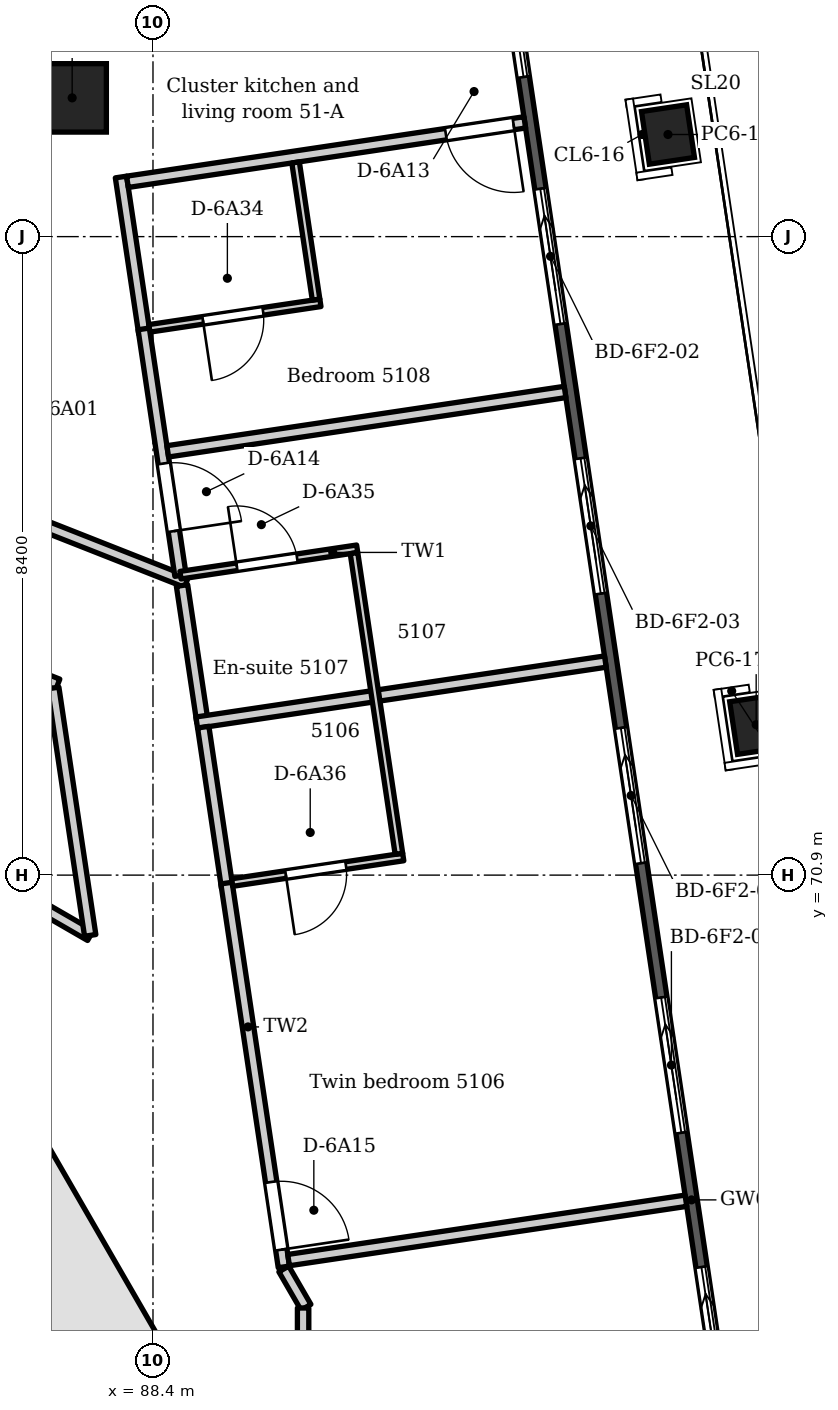
"""IFC4 building model, lengths in metres.
Left out: names, types, materials, properties, quantities, classifications, styles, units other than length and angle.
Written with IfcOpenShell. Run it as: python <this file> out.ifc"""

import sys

from ifc_helpers import new_model, si_unit, direction, frame, frame_2d, origin, origin_2d, place, context, subcontext, project, spatial, polyline, rectangle, circle, outline, extrude, element, fill, save


model = new_model("IFC4")
c1 = context("Model", 3, precision=1e-05, world=origin(), true_north=direction((0.0, 1.0)))
c2 = subcontext(c1, "Body", "Model", "MODEL_VIEW")
j1 = project(units=[si_unit("LENGTHUNIT", "METRE"), si_unit("PLANEANGLEUNIT", "RADIAN")], contexts=[c1])
p1 = place(None, origin())
s1 = spatial("IfcSite", under=j1, at=p1, CompositionType="ELEMENT")
p2 = place(p1, origin())
s2 = spatial("IfcBuilding", under=s1, at=p2, CompositionType="ELEMENT")
p3 = place(p2, frame((0.0, 0.0, 198.0)))
s3 = spatial("IfcBuildingStorey", under=s2, at=p3, CompositionType="ELEMENT", Elevation=198.0)
p4 = place(p3, frame((88.197, 64.603, 0.0), z_axis=(0.0, 0.0, 1.0), x_axis=(-0.499983800959, 0.866034756103, 0.0)))
e1 = element("IfcWall", 1, at=p4, inside=s3, PredefinedType="SHEAR", context=c2, shape_type="SweptSolid", body=[
    extrude(outline(polyline([(0.0, -0.35), (4.555, -0.35), (4.368, 0.35), (0.188, 0.35), (0.0, -0.35)])), origin(), (0.0, 0.0, 1.0), 3.6),
])
p5 = place(p4, frame((1.677, 0.0, 0.0)))
e2 = element("IfcOpeningElement", 2, at=p5, cuts=e1, PredefinedType="OPENING", context=c2, shape_type="SweptSolid", body=[
    extrude(rectangle(XDim=1.2, YDim=2.1, at=frame_2d((0.6, 1.05))), frame((0.0, 0.36, 0.0), z_axis=(0.0, -1.0, 0.0), x_axis=(1.0, 0.0, 0.0)), (0.0, 0.0, 1.0), 0.72),
])
p6 = place(p3, frame((83.619, 63.031, 0.0), z_axis=(0.0, 0.0, 1.0), x_axis=(0.866059941101, 0.499940174841, 0.0)))
e3 = element("IfcWall", 3, at=p6, inside=s3, PredefinedType="SHEAR", context=c2, shape_type="SweptSolid", body=[
    extrude(rectangle(XDim=4.4, YDim=0.3, at=frame_2d((2.2, 0.0))), origin(), (0.0, 0.0, 1.0), 3.6),
])
p7 = place(p6, frame((1.4, 0.0, 0.0)))
e4 = element("IfcOpeningElement", 4, at=p7, cuts=e3, PredefinedType="OPENING", context=c2, shape_type="SweptSolid", body=[
    extrude(rectangle(XDim=0.9, YDim=2.1, at=frame_2d((0.45, 1.05))), frame((0.0, 0.16, 0.0), z_axis=(0.0, -1.0, 0.0), x_axis=(1.0, 0.0, 0.0)), (0.0, 0.0, 1.0), 0.32),
])
for number, where, z_axis, x_axis in (
    (5, (95.175, 80.644, -0.35), (0.0, 0.0, 1.0), (-0.148, 0.989, 0.0)),
    (6, (96.336, 72.879, -0.35), (0.0, 0.0, 1.0), (-0.148, 0.989, 0.0)),
):
    element("IfcColumn", number, at=place(p3, frame(where, z_axis=z_axis, x_axis=x_axis)), inside=s3, PredefinedType="COLUMN", context=c2, shape_type="SweptSolid", body=[
        extrude(rectangle(XDim=0.7, YDim=0.6, at=origin_2d()), origin(), (0.0, 0.0, 1.0), 3.95),
    ])
p8 = place(p3, frame((87.337, 81.125, -0.35), z_axis=(0.0, 0.0, 1.0), x_axis=(1.0, 0.0, 0.0)))
e7 = element("IfcColumn", 7, at=p8, inside=s3, PredefinedType="COLUMN", context=c2, shape_type="SweptSolid", body=[
    extrude(circle(Radius=0.45, at=origin_2d()), origin(), (0.0, 0.0, 1.0), 3.95),
])
p9 = place(p3, frame((92.835, 84.36, 0.0), z_axis=(0.0, 0.0, 1.0), x_axis=(0.147810490781, -0.989015702006, 0.0)))
e8 = element("IfcWall", 8, at=p9, inside=s3, PredefinedType="SOLIDWALL", context=c2, shape_type="SweptSolid", body=[
    extrude(outline(polyline([(0.149, 0.075), (0.149, -0.075), (39.297, -0.075), (39.297, 0.075), (0.149, 0.075)])), origin(), (0.0, 0.0, 1.0), 3.3),
])
p10 = place(p9, frame((1.193, 0.0, 0.0)))
e9 = element("IfcOpeningElement", 9, at=p10, cuts=e8, PredefinedType="OPENING", context=c2, shape_type="SweptSolid", body=[
    extrude(rectangle(XDim=1.8, YDim=2.6, at=frame_2d((0.9, 1.3))), frame((0.0, 0.085, 0.0), z_axis=(0.0, -1.0, 0.0), x_axis=(1.0, 0.0, 0.0)), (0.0, 0.0, 1.0), 0.17),
])
p11 = place(p9, frame((4.479, 0.0, 0.0)))
e10 = element("IfcOpeningElement", 10, at=p11, cuts=e8, PredefinedType="OPENING", context=c2, shape_type="SweptSolid", body=[
    extrude(rectangle(XDim=1.8, YDim=2.6, at=frame_2d((0.9, 1.3))), frame((0.0, 0.085, 0.0), z_axis=(0.0, -1.0, 0.0), x_axis=(1.0, 0.0, 0.0)), (0.0, 0.0, 1.0), 0.17),
])
p12 = place(p9, frame((8.065, 0.0, 0.0)))
e11 = element("IfcOpeningElement", 11, at=p12, cuts=e8, PredefinedType="OPENING", context=c2, shape_type="SweptSolid", body=[
    extrude(rectangle(XDim=1.8, YDim=2.6, at=frame_2d((0.9, 1.3))), frame((0.0, 0.085, 0.0), z_axis=(0.0, -1.0, 0.0), x_axis=(1.0, 0.0, 0.0)), (0.0, 0.0, 1.0), 0.17),
])
p13 = place(p9, frame((11.651, 0.0, 0.0)))
e12 = element("IfcOpeningElement", 12, at=p13, cuts=e8, PredefinedType="OPENING", context=c2, shape_type="SweptSolid", body=[
    extrude(rectangle(XDim=1.8, YDim=2.6, at=frame_2d((0.9, 1.3))), frame((0.0, 0.085, 0.0), z_axis=(0.0, -1.0, 0.0), x_axis=(1.0, 0.0, 0.0)), (0.0, 0.0, 1.0), 0.17),
])
p14 = place(p9, frame((15.237, 0.0, 0.0)))
e13 = element("IfcOpeningElement", 13, at=p14, cuts=e8, PredefinedType="OPENING", context=c2, shape_type="SweptSolid", body=[
    extrude(rectangle(XDim=1.8, YDim=2.6, at=frame_2d((0.9, 1.3))), frame((0.0, 0.085, 0.0), z_axis=(0.0, -1.0, 0.0), x_axis=(1.0, 0.0, 0.0)), (0.0, 0.0, 1.0), 0.17),
])
p15 = place(p9, frame((18.823, 0.0, 0.0)))
e14 = element("IfcOpeningElement", 14, at=p15, cuts=e8, PredefinedType="OPENING", context=c2, shape_type="SweptSolid", body=[
    extrude(rectangle(XDim=1.8, YDim=2.6, at=frame_2d((0.9, 1.3))), frame((0.0, 0.085, 0.0), z_axis=(0.0, -1.0, 0.0), x_axis=(1.0, 0.0, 0.0)), (0.0, 0.0, 1.0), 0.17),
])
p16 = place(p9, frame((22.409, 0.0, 0.0)))
e15 = element("IfcOpeningElement", 15, at=p16, cuts=e8, PredefinedType="OPENING", context=c2, shape_type="SweptSolid", body=[
    extrude(rectangle(XDim=1.8, YDim=2.6, at=frame_2d((0.9, 1.3))), frame((0.0, 0.085, 0.0), z_axis=(0.0, -1.0, 0.0), x_axis=(1.0, 0.0, 0.0)), (0.0, 0.0, 1.0), 0.17),
])
p17 = place(p9, frame((25.995, 0.0, 0.0)))
e16 = element("IfcOpeningElement", 16, at=p17, cuts=e8, PredefinedType="OPENING", context=c2, shape_type="SweptSolid", body=[
    extrude(rectangle(XDim=1.8, YDim=2.6, at=frame_2d((0.9, 1.3))), frame((0.0, 0.085, 0.0), z_axis=(0.0, -1.0, 0.0), x_axis=(1.0, 0.0, 0.0)), (0.0, 0.0, 1.0), 0.17),
])
p18 = place(p9, frame((29.581, 0.0, 0.0)))
e17 = element("IfcOpeningElement", 17, at=p18, cuts=e8, PredefinedType="OPENING", context=c2, shape_type="SweptSolid", body=[
    extrude(rectangle(XDim=1.8, YDim=2.6, at=frame_2d((0.9, 1.3))), frame((0.0, 0.085, 0.0), z_axis=(0.0, -1.0, 0.0), x_axis=(1.0, 0.0, 0.0)), (0.0, 0.0, 1.0), 0.17),
])
p19 = place(p9, frame((33.167, 0.0, 0.0)))
e18 = element("IfcOpeningElement", 18, at=p19, cuts=e8, PredefinedType="OPENING", context=c2, shape_type="SweptSolid", body=[
    extrude(rectangle(XDim=1.8, YDim=2.6, at=frame_2d((0.9, 1.3))), frame((0.0, 0.085, 0.0), z_axis=(0.0, -1.0, 0.0), x_axis=(1.0, 0.0, 0.0)), (0.0, 0.0, 1.0), 0.17),
])
p20 = place(p9, frame((36.453, 0.0, 0.0)))
e19 = element("IfcOpeningElement", 19, at=p20, cuts=e8, PredefinedType="OPENING", context=c2, shape_type="SweptSolid", body=[
    extrude(rectangle(XDim=1.8, YDim=2.6, at=frame_2d((0.9, 1.3))), frame((0.0, 0.085, 0.0), z_axis=(0.0, -1.0, 0.0), x_axis=(1.0, 0.0, 0.0)), (0.0, 0.0, 1.0), 0.17),
])
p21 = place(p3, frame((82.353, 75.298, 0.0), z_axis=(0.0, 0.0, 1.0), x_axis=(0.930366278921, -0.366631404883, 0.0)))
e20 = element("IfcWall", 20, at=p21, inside=s3, PredefinedType="PARTITIONING", context=c2, shape_type="SweptSolid", body=[
    extrude(rectangle(XDim=5.153, YDim=0.15, at=frame_2d((2.576, 0.0))), origin(), (0.0, 0.0, 1.0), 2.8),
])
p22 = place(p3, frame((82.845, 72.837, 0.0), z_axis=(0.0, 0.0, 1.0), x_axis=(0.865990633405, -0.500060219228, 0.0)))
e21 = element("IfcWall", 21, at=p22, inside=s3, PredefinedType="PARTITIONING", context=c2, shape_type="SweptSolid", body=[
    extrude(rectangle(XDim=5.464, YDim=0.15, at=frame_2d((2.732, 0.0))), origin(), (0.0, 0.0, 1.0), 2.8),
])
p23 = place(p22, frame((2.281, 0.0, 0.0)))
e22 = element("IfcOpeningElement", 22, at=p23, cuts=e21, PredefinedType="OPENING", context=c2, shape_type="SweptSolid", body=[
    extrude(rectangle(XDim=0.9, YDim=2.1, at=frame_2d((0.45, 1.05))), frame((0.0, 0.085, 0.0), z_axis=(0.0, -1.0, 0.0), x_axis=(1.0, 0.0, 0.0)), (0.0, 0.0, 1.0), 0.17),
])
p24 = place(p3, frame((86.757, 75.578, 0.0), z_axis=(0.0, 0.0, 1.0), x_axis=(0.930344172236, -0.366687497997, 0.0)))
e23 = element("IfcWall", 23, at=p24, inside=s3, PredefinedType="PARTITIONING", context=c2, shape_type="SweptSolid", body=[
    extrude(rectangle(XDim=2.24, YDim=0.15, at=frame_2d((1.12, 0.0))), origin(), (0.0, 0.0, 1.0), 3.3),
])
p25 = place(p3, frame((87.088, 73.362, 0.0), z_axis=(0.0, 0.0, 1.0), x_axis=(0.147629393442, -0.989042750437, 0.0)))
e24 = element("IfcWall", 24, at=p25, inside=s3, PredefinedType="PARTITIONING", context=c2, shape_type="SweptSolid", body=[
    extrude(rectangle(XDim=3.291, YDim=0.15, at=frame_2d((1.646, 0.0))), origin(), (0.0, 0.0, 1.0), 3.3),
])
p26 = place(p3, frame((87.979, 80.084, 0.0), z_axis=(0.0, 0.0, 1.0), x_axis=(0.147880939426, -0.989005170742, 0.0)))
e25 = element("IfcWall", 25, at=p26, inside=s3, PredefinedType="PARTITIONING", context=c2, shape_type="SweptSolid", body=[
    extrude(rectangle(XDim=2.079, YDim=0.15, at=frame_2d((1.039, 0.0))), origin(), (0.0, 0.0, 1.0), 3.3),
])
p27 = place(p3, frame((88.064, 80.021, 0.0), z_axis=(0.0, 0.0, 1.0), x_axis=(0.988994889639, 0.147949681543, 0.0)))
e26 = element("IfcWall", 26, at=p27, inside=s3, PredefinedType="PARTITIONING", context=c2, shape_type="SweptSolid", body=[
    extrude(rectangle(XDim=5.285, YDim=0.15, at=frame_2d((2.643, 0.0))), origin(), (0.0, 0.0, 1.0), 3.3),
])
p28 = place(p27, frame((4.235, 0.0, 0.0)))
e27 = element("IfcOpeningElement", 27, at=p28, cuts=e26, PredefinedType="OPENING", context=c2, shape_type="SweptSolid", body=[
    extrude(rectangle(XDim=0.9, YDim=2.1, at=frame_2d((0.45, 1.05))), frame((0.0, 0.085, 0.0), z_axis=(0.0, -1.0, 0.0), x_axis=(1.0, 0.0, 0.0)), (0.0, 0.0, 1.0), 0.17),
])
p29 = place(p3, frame((88.352, 78.093, 0.0), z_axis=(0.0, 0.0, 1.0), x_axis=(0.989007860101, 0.147862952286, 0.0)))
e28 = element("IfcWall", 28, at=p29, inside=s3, PredefinedType="PARTITIONING", context=c2, shape_type="SweptSolid", body=[
    extrude(rectangle(XDim=2.275, YDim=0.1, at=frame_2d((1.138, 0.0))), origin(), (0.0, 0.0, 1.0), 3.3),
])
p30 = place(p29, frame((0.713, 0.0, 0.0)))
e29 = element("IfcOpeningElement", 29, at=p30, cuts=e28, PredefinedType="OPENING", context=c2, shape_type="SweptSolid", body=[
    extrude(rectangle(XDim=0.8, YDim=2.1, at=frame_2d((0.4, 1.05))), frame((0.0, 0.06, 0.0), z_axis=(0.0, -1.0, 0.0), x_axis=(1.0, 0.0, 0.0)), (0.0, 0.0, 1.0), 0.12),
])
p31 = place(p3, frame((88.278, 78.086, 0.0), z_axis=(0.0, 0.0, 1.0), x_axis=(0.147535964678, -0.989056691563, 0.0)))
e30 = element("IfcWall", 30, at=p31, inside=s3, PredefinedType="PARTITIONING", context=c2, shape_type="SweptSolid", body=[
    extrude(rectangle(XDim=3.28, YDim=0.15, at=frame_2d((1.64, 0.0))), origin(), (0.0, 0.0, 1.0), 3.3),
])
p32 = place(p31, frame((1.79, 0.0, 0.0)))
e31 = element("IfcOpeningElement", 31, at=p32, cuts=e30, PredefinedType="OPENING", context=c2, shape_type="SweptSolid", body=[
    extrude(rectangle(XDim=0.9, YDim=2.1, at=frame_2d((0.45, 1.05))), frame((0.0, 0.085, 0.0), z_axis=(0.0, -1.0, 0.0), x_axis=(1.0, 0.0, 0.0)), (0.0, 0.0, 1.0), 0.17),
])
p33 = place(p3, frame((88.594, 76.475, 0.0), z_axis=(0.0, 0.0, 1.0), x_axis=(0.989020900083, 0.147775705715, 0.0)))
e32 = element("IfcWall", 32, at=p33, inside=s3, PredefinedType="PARTITIONING", context=c2, shape_type="SweptSolid", body=[
    extrude(rectangle(XDim=5.285, YDim=0.15, at=frame_2d((2.643, 0.0))), origin(), (0.0, 0.0, 1.0), 3.3),
])
p34 = place(p3, frame((88.762, 74.846, 0.0), z_axis=(0.0, 0.0, 1.0), x_axis=(0.989014693812, 0.147817236561, 0.0)))
e33 = element("IfcWall", 33, at=p34, inside=s3, PredefinedType="PARTITIONING", context=c2, shape_type="SweptSolid", body=[
    extrude(rectangle(XDim=2.35, YDim=0.1, at=frame_2d((1.175, 0.0))), origin(), (0.0, 0.0, 1.0), 3.3),
])
p35 = place(p34, frame((0.75, 0.0, 0.0)))
e34 = element("IfcOpeningElement", 34, at=p35, cuts=e33, PredefinedType="OPENING", context=c2, shape_type="SweptSolid", body=[
    extrude(rectangle(XDim=0.8, YDim=2.1, at=frame_2d((0.4, 1.05))), frame((0.0, 0.06, 0.0), z_axis=(0.0, -1.0, 0.0), x_axis=(1.0, 0.0, 0.0)), (0.0, 0.0, 1.0), 0.12),
])
p36 = place(p3, frame((88.782, 74.71, 0.0), z_axis=(0.0, 0.0, 1.0), x_axis=(0.148097298626, -0.98897279545, 0.0)))
e35 = element("IfcWall", 35, at=p36, inside=s3, PredefinedType="PARTITIONING", context=c2, shape_type="SweptSolid", body=[
    extrude(rectangle(XDim=1.817, YDim=0.15, at=frame_2d((0.908, 0.0))), origin(), (0.0, 0.0, 1.0), 3.3),
])
p37 = place(p3, frame((88.976, 72.906, 0.0), z_axis=(0.0, 0.0, 1.0), x_axis=(0.989026447028, 0.147738576813, 0.0)))
e36 = element("IfcWall", 36, at=p37, inside=s3, PredefinedType="PARTITIONING", context=c2, shape_type="SweptSolid", body=[
    extrude(rectangle(XDim=5.435, YDim=0.15, at=frame_2d((2.718, 0.0))), origin(), (0.0, 0.0, 1.0), 3.3),
])
p38 = place(p3, frame((89.061, 72.847, 0.0), z_axis=(0.0, 0.0, 1.0), x_axis=(0.147461434702, -0.989067806207, 0.0)))
e37 = element("IfcWall", 37, at=p38, inside=s3, PredefinedType="PARTITIONING", context=c2, shape_type="SweptSolid", body=[
    extrude(rectangle(XDim=2.132, YDim=0.15, at=frame_2d((1.066, 0.0))), origin(), (0.0, 0.0, 1.0), 3.3),
])
p39 = place(p3, frame((89.367, 70.795, 0.0), z_axis=(0.0, 0.0, 1.0), x_axis=(0.147912499189, -0.989000451256, 0.0)))
e38 = element("IfcWall", 38, at=p39, inside=s3, PredefinedType="PARTITIONING", context=c2, shape_type="SweptSolid", body=[
    extrude(rectangle(XDim=5.105, YDim=0.15, at=frame_2d((2.553, 0.0))), origin(), (0.0, 0.0, 1.0), 3.3),
])
p40 = place(p39, frame((3.976, 0.0, 0.0)))
e39 = element("IfcOpeningElement", 39, at=p40, cuts=e38, PredefinedType="OPENING", context=c2, shape_type="SweptSolid", body=[
    extrude(rectangle(XDim=0.9, YDim=2.1, at=frame_2d((0.45, 1.05))), frame((0.0, 0.085, 0.0), z_axis=(0.0, -1.0, 0.0), x_axis=(1.0, 0.0, 0.0)), (0.0, 0.0, 1.0), 0.17),
])
p41 = place(p3, frame((89.442, 70.802, 0.0), z_axis=(0.0, 0.0, 1.0), x_axis=(0.989007860101, 0.147862952286, 0.0)))
e40 = element("IfcWall", 40, at=p41, inside=s3, PredefinedType="PARTITIONING", context=c2, shape_type="SweptSolid", body=[
    extrude(rectangle(XDim=2.275, YDim=0.1, at=frame_2d((1.138, 0.0))), origin(), (0.0, 0.0, 1.0), 3.3),
])
p42 = place(p41, frame((0.713, 0.0, 0.0)))
e41 = element("IfcOpeningElement", 41, at=p42, cuts=e40, PredefinedType="OPENING", context=c2, shape_type="SweptSolid", body=[
    extrude(rectangle(XDim=0.8, YDim=2.1, at=frame_2d((0.4, 1.05))), frame((0.0, 0.06, 0.0), z_axis=(0.0, -1.0, 0.0), x_axis=(1.0, 0.0, 0.0)), (0.0, 0.0, 1.0), 0.12),
])
p43 = place(p3, frame((90.184, 65.835, 0.0), z_axis=(0.0, 0.0, 1.0), x_axis=(0.98902190879, 0.147768954566, 0.0)))
e42 = element("IfcWall", 42, at=p43, inside=s3, PredefinedType="PARTITIONING", context=c2, shape_type="SweptSolid", body=[
    extrude(rectangle(XDim=5.285, YDim=0.15, at=frame_2d((2.643, 0.0))), origin(), (0.0, 0.0, 1.0), 3.3),
])
p44 = place(p3, frame((90.121, 65.719, 0.0), z_axis=(0.0, 0.0, 1.0), x_axis=(0.500738673164, -0.865598510395, 0.0)))
e43 = element("IfcWall", 43, at=p44, inside=s3, PredefinedType="PARTITIONING", context=c2, shape_type="SweptSolid", body=[
    extrude(rectangle(XDim=0.582, YDim=0.15, at=frame_2d((0.291, 0.0))), origin(), (0.0, 0.0, 1.0), 3.3),
])
p45 = place(p3, frame((90.276, 80.276, 0.0), z_axis=(0.0, 0.0, 1.0), x_axis=(0.14773187693, -0.989027447819, 0.0)))
e44 = element("IfcWall", 44, at=p45, inside=s3, PredefinedType="PARTITIONING", context=c2, shape_type="SweptSolid", body=[
    extrude(rectangle(XDim=1.824, YDim=0.1, at=frame_2d((0.912, 0.0))), origin(), (0.0, 0.0, 1.0), 3.3),
])
p46 = place(p3, frame((90.375, 64.023, 0.0), z_axis=(0.0, 0.0, 1.0), x_axis=(0.0, 1.0, 0.0)))
e45 = element("IfcWall", 45, at=p46, inside=s3, PredefinedType="PARTITIONING", context=c2, shape_type="SweptSolid", body=[
    extrude(rectangle(XDim=1.182, YDim=0.15, at=frame_2d((0.591, 0.0))), origin(), (0.0, 0.0, 1.0), 3.3),
])
p47 = place(p3, frame((91.044, 75.136, 0.0), z_axis=(0.0, 0.0, 1.0), x_axis=(0.147767379107, -0.989022144177, 0.0)))
e46 = element("IfcWall", 46, at=p47, inside=s3, PredefinedType="PARTITIONING", context=c2, shape_type="SweptSolid", body=[
    extrude(rectangle(XDim=4.0, YDim=0.1, at=frame_2d((2.0, 0.0))), origin(), (0.0, 0.0, 1.0), 3.3),
])
p48 = place(p10, origin())
e47 = element("IfcDoor", 47, at=p48, inside=s3, OperationType="SLIDING_TO_LEFT", PredefinedType="DOOR", context=c2, shape_type="SweptSolid", body=[
    extrude(rectangle(XDim=1.8, YDim=2.6, at=frame_2d((0.9, 1.3))), frame((0.0, 0.025, 0.0), z_axis=(0.0, -1.0, 0.0), x_axis=(1.0, 0.0, 0.0)), (0.0, 0.0, 1.0), 0.05),
])
fill(e9, e47)
p49 = place(p11, origin())
e48 = element("IfcDoor", 48, at=p49, inside=s3, OperationType="SLIDING_TO_LEFT", PredefinedType="DOOR", context=c2, shape_type="SweptSolid", body=[
    extrude(rectangle(XDim=1.8, YDim=2.6, at=frame_2d((0.9, 1.3))), frame((0.0, 0.025, 0.0), z_axis=(0.0, -1.0, 0.0), x_axis=(1.0, 0.0, 0.0)), (0.0, 0.0, 1.0), 0.05),
])
fill(e10, e48)
p50 = place(p12, origin())
e49 = element("IfcDoor", 49, at=p50, inside=s3, OperationType="SLIDING_TO_LEFT", PredefinedType="DOOR", context=c2, shape_type="SweptSolid", body=[
    extrude(rectangle(XDim=1.8, YDim=2.6, at=frame_2d((0.9, 1.3))), frame((0.0, 0.025, 0.0), z_axis=(0.0, -1.0, 0.0), x_axis=(1.0, 0.0, 0.0)), (0.0, 0.0, 1.0), 0.05),
])
fill(e11, e49)
p51 = place(p13, origin())
e50 = element("IfcDoor", 50, at=p51, inside=s3, OperationType="SLIDING_TO_LEFT", PredefinedType="DOOR", context=c2, shape_type="SweptSolid", body=[
    extrude(rectangle(XDim=1.8, YDim=2.6, at=frame_2d((0.9, 1.3))), frame((0.0, 0.025, 0.0), z_axis=(0.0, -1.0, 0.0), x_axis=(1.0, 0.0, 0.0)), (0.0, 0.0, 1.0), 0.05),
])
fill(e12, e50)
p52 = place(p14, origin())
e51 = element("IfcDoor", 51, at=p52, inside=s3, OperationType="SLIDING_TO_LEFT", PredefinedType="DOOR", context=c2, shape_type="SweptSolid", body=[
    extrude(rectangle(XDim=1.8, YDim=2.6, at=frame_2d((0.9, 1.3))), frame((0.0, 0.025, 0.0), z_axis=(0.0, -1.0, 0.0), x_axis=(1.0, 0.0, 0.0)), (0.0, 0.0, 1.0), 0.05),
])
fill(e13, e51)
p53 = place(p15, origin())
e52 = element("IfcDoor", 52, at=p53, inside=s3, OperationType="SLIDING_TO_LEFT", PredefinedType="DOOR", context=c2, shape_type="SweptSolid", body=[
    extrude(rectangle(XDim=1.8, YDim=2.6, at=frame_2d((0.9, 1.3))), frame((0.0, 0.025, 0.0), z_axis=(0.0, -1.0, 0.0), x_axis=(1.0, 0.0, 0.0)), (0.0, 0.0, 1.0), 0.05),
])
fill(e14, e52)
p54 = place(p28, frame((0.9, 0.0, 0.0), z_axis=(0.0, 0.0, 1.0), x_axis=(-1.0, 0.0, 0.0)))
e53 = element("IfcDoor", 53, at=p54, inside=s3, OperationType="SINGLE_SWING_LEFT", PredefinedType="DOOR", context=c2, shape_type="SweptSolid", body=[
    extrude(rectangle(XDim=0.9, YDim=2.1, at=frame_2d((0.45, 1.05))), frame((0.0, 0.025, 0.0), z_axis=(0.0, -1.0, 0.0), x_axis=(1.0, 0.0, 0.0)), (0.0, 0.0, 1.0), 0.05),
])
fill(e27, e53)
p55 = place(p32, origin())
e54 = element("IfcDoor", 54, at=p55, inside=s3, OperationType="SINGLE_SWING_RIGHT", PredefinedType="DOOR", context=c2, shape_type="SweptSolid", body=[
    extrude(rectangle(XDim=0.9, YDim=2.1, at=frame_2d((0.45, 1.05))), frame((0.0, 0.025, 0.0), z_axis=(0.0, -1.0, 0.0), x_axis=(1.0, 0.0, 0.0)), (0.0, 0.0, 1.0), 0.05),
])
fill(e31, e54)
p56 = place(p40, origin())
e55 = element("IfcDoor", 55, at=p56, inside=s3, OperationType="SINGLE_SWING_RIGHT", PredefinedType="DOOR", context=c2, shape_type="SweptSolid", body=[
    extrude(rectangle(XDim=0.9, YDim=2.1, at=frame_2d((0.45, 1.05))), frame((0.0, 0.025, 0.0), z_axis=(0.0, -1.0, 0.0), x_axis=(1.0, 0.0, 0.0)), (0.0, 0.0, 1.0), 0.05),
])
fill(e39, e55)
p57 = place(p30, frame((0.8, 0.0, 0.0), z_axis=(0.0, 0.0, 1.0), x_axis=(-1.0, 0.0, 0.0)))
e56 = element("IfcDoor", 56, at=p57, inside=s3, OperationType="SINGLE_SWING_RIGHT", PredefinedType="DOOR", context=c2, shape_type="SweptSolid", body=[
    extrude(rectangle(XDim=0.8, YDim=2.1, at=frame_2d((0.4, 1.05))), frame((0.0, 0.025, 0.0), z_axis=(0.0, -1.0, 0.0), x_axis=(1.0, 0.0, 0.0)), (0.0, 0.0, 1.0), 0.05),
])
fill(e29, e56)
p58 = place(p35, origin())
e57 = element("IfcDoor", 57, at=p58, inside=s3, OperationType="SINGLE_SWING_LEFT", PredefinedType="DOOR", context=c2, shape_type="SweptSolid", body=[
    extrude(rectangle(XDim=0.8, YDim=2.1, at=frame_2d((0.4, 1.05))), frame((0.0, 0.025, 0.0), z_axis=(0.0, -1.0, 0.0), x_axis=(1.0, 0.0, 0.0)), (0.0, 0.0, 1.0), 0.05),
])
fill(e34, e57)
p59 = place(p42, frame((0.8, 0.0, 0.0), z_axis=(0.0, 0.0, 1.0), x_axis=(-1.0, 0.0, 0.0)))
e58 = element("IfcDoor", 58, at=p59, inside=s3, OperationType="SINGLE_SWING_RIGHT", PredefinedType="DOOR", context=c2, shape_type="SweptSolid", body=[
    extrude(rectangle(XDim=0.8, YDim=2.1, at=frame_2d((0.4, 1.05))), frame((0.0, 0.025, 0.0), z_axis=(0.0, -1.0, 0.0), x_axis=(1.0, 0.0, 0.0)), (0.0, 0.0, 1.0), 0.05),
])
fill(e41, e58)
p60 = place(p5, origin())
e59 = element("IfcDoor", 59, at=p60, inside=s3, OperationType="DOUBLE_DOOR_SINGLE_SWING", PredefinedType="DOOR", context=c2, shape_type="SweptSolid", body=[
    extrude(rectangle(XDim=1.2, YDim=2.1, at=frame_2d((0.6, 1.05))), frame((0.0, 0.025, 0.0), z_axis=(0.0, -1.0, 0.0), x_axis=(1.0, 0.0, 0.0)), (0.0, 0.0, 1.0), 0.05),
])
fill(e2, e59)
save(model, sys.argv[1])
